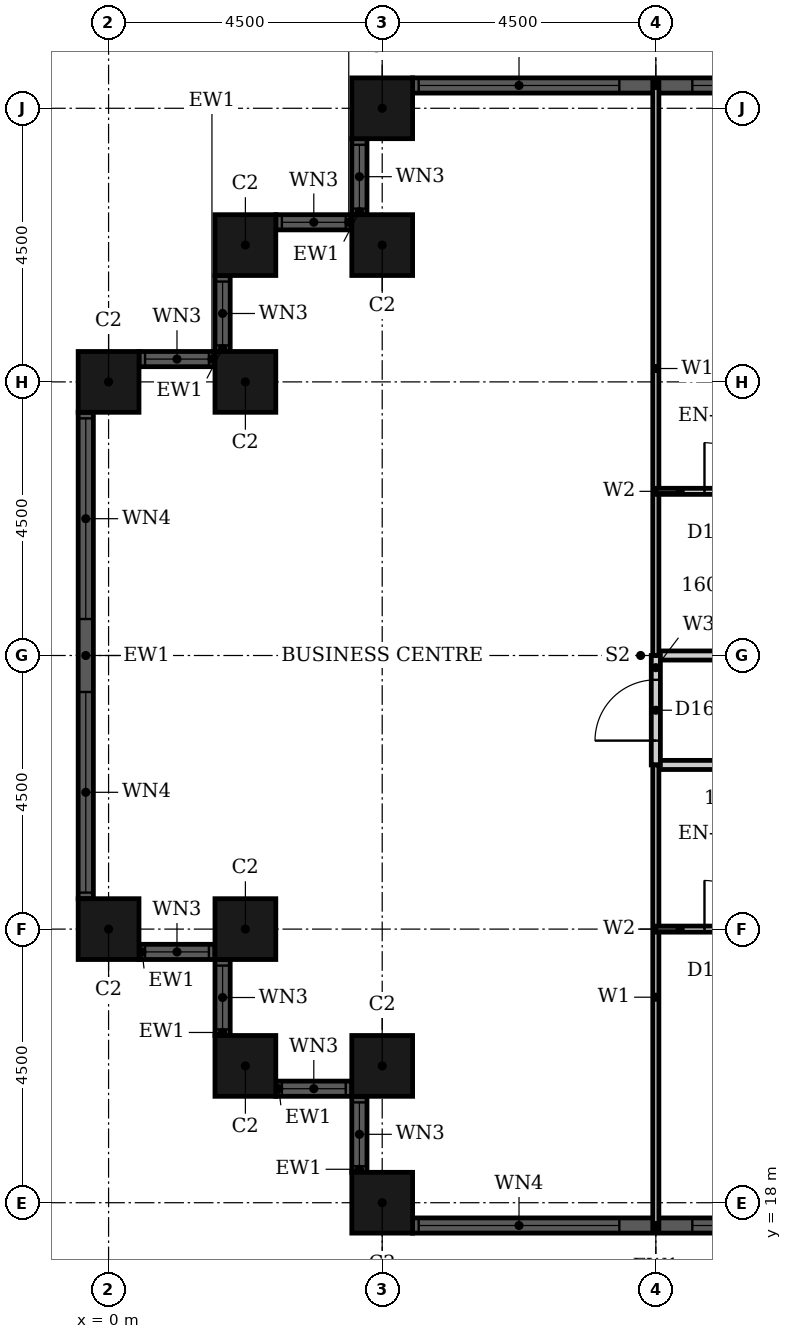
"""IFC4 building model, lengths in metres.
Left out: names, types, materials, properties, quantities, classifications, styles, units other than length and angle.
Written with IfcOpenShell. Run it as: python <this file> out.ifc"""

import sys

from ifc_helpers import new_model, si_unit, direction, frame, frame_2d, origin, origin_2d, place, context, subcontext, project, spatial, rectangle, hollow_rectangle, extrude, element, fill, save


model = new_model("IFC4")
c1 = context("Model", 3, precision=1e-05, world=origin(), true_north=direction((0.0, 1.0)))
c2 = subcontext(c1, "Body", "Model", "MODEL_VIEW")
j1 = project(units=[si_unit("LENGTHUNIT", "METRE"), si_unit("PLANEANGLEUNIT", "RADIAN")], contexts=[c1])
p1 = place(None, origin())
s1 = spatial("IfcSite", under=j1, at=p1, CompositionType="ELEMENT")
p2 = place(p1, origin())
s2 = spatial("IfcBuilding", under=s1, at=p2, CompositionType="ELEMENT")
p3 = place(p2, frame((0.0, 0.0, 70.8)))
s3 = spatial("IfcBuildingStorey", under=s2, at=p3, CompositionType="ELEMENT", Elevation=70.8)
for number, where, z_axis, x_axis in (
    (1, (4.5, 36.0, 0.0), (0.0, 0.0, 1.0), (1.0, 0.0, 0.0)),
    (2, (4.5, 33.75, 0.0), (0.0, 0.0, 1.0), (1.0, 0.0, 0.0)),
    (3, (2.25, 33.75, 0.0), (0.0, 0.0, 1.0), (1.0, 0.0, 0.0)),
    (4, (2.25, 31.5, 0.0), (0.0, 0.0, 1.0), (1.0, 0.0, 0.0)),
    (5, (0.0, 31.5, 0.0), (0.0, 0.0, 1.0), (1.0, 0.0, 0.0)),
    (6, (0.0, 22.5, 0.0), (0.0, 0.0, 1.0), (1.0, 0.0, 0.0)),
    (7, (2.25, 22.5, 0.0), (0.0, 0.0, 1.0), (1.0, 0.0, 0.0)),
    (8, (2.25, 20.25, 0.0), (0.0, 0.0, 1.0), (1.0, 0.0, 0.0)),
    (9, (4.5, 20.25, 0.0), (0.0, 0.0, 1.0), (1.0, 0.0, 0.0)),
    (10, (4.5, 18.0, 0.0), (0.0, 0.0, 1.0), (1.0, 0.0, 0.0)),
):
    element("IfcColumn", number, at=place(p3, frame(where, z_axis=z_axis, x_axis=x_axis)), inside=s3, PredefinedType="COLUMN", context=c2, shape_type="SweptSolid", body=[
        extrude(hollow_rectangle(XDim=1.0, YDim=1.0, WallThickness=0.032, at=origin_2d()), origin(), (0.0, 0.0, 1.0), 3.6),
    ])
p4 = place(p3, frame((13.0, 36.375, 0.0), z_axis=(0.0, 0.0, 1.0), x_axis=(-1.0, 0.0, 0.0)))
e11 = element("IfcWall", 11, at=p4, inside=s3, PredefinedType="SOLIDWALL", context=c2, shape_type="SweptSolid", body=[
    extrude(rectangle(XDim=8.0, YDim=0.25, at=frame_2d((4.0, 0.0))), origin(), (0.0, 0.0, 1.0), 3.6),
])
p5 = place(p4, frame((0.1, 0.0, 0.9)))
e12 = element("IfcOpeningElement", 12, at=p5, cuts=e11, PredefinedType="OPENING", context=c2, shape_type="SweptSolid", body=[
    extrude(rectangle(XDim=3.3, YDim=2.08, at=frame_2d((1.65, 1.04))), frame((0.0, 0.135, 0.0), z_axis=(0.0, -1.0, 0.0), x_axis=(1.0, 0.0, 0.0)), (0.0, 0.0, 1.0), 0.27),
])
p6 = place(p4, frame((4.6, 0.0, 0.9)))
e13 = element("IfcOpeningElement", 13, at=p6, cuts=e11, PredefinedType="OPENING", context=c2, shape_type="SweptSolid", body=[
    extrude(rectangle(XDim=3.3, YDim=2.08, at=frame_2d((1.65, 1.04))), frame((0.0, 0.135, 0.0), z_axis=(0.0, -1.0, 0.0), x_axis=(1.0, 0.0, 0.0)), (0.0, 0.0, 1.0), 0.27),
])
p7 = place(p3, frame((4.125, 35.5, 0.0), z_axis=(0.0, 0.0, 1.0), x_axis=(0.0, -1.0, 0.0)))
e14 = element("IfcWall", 14, at=p7, inside=s3, PredefinedType="SOLIDWALL", context=c2, shape_type="SweptSolid", body=[
    extrude(rectangle(XDim=1.25, YDim=0.25, at=frame_2d((0.625, 0.0))), origin(), (0.0, 0.0, 1.0), 3.6),
])
p8 = place(p7, frame((0.1, 0.0, 0.9)))
e15 = element("IfcOpeningElement", 15, at=p8, cuts=e14, PredefinedType="OPENING", context=c2, shape_type="SweptSolid", body=[
    extrude(rectangle(XDim=1.05, YDim=2.08, at=frame_2d((0.525, 1.04))), frame((0.0, 0.135, 0.0), z_axis=(0.0, -1.0, 0.0), x_axis=(1.0, 0.0, 0.0)), (0.0, 0.0, 1.0), 0.27),
])
p9 = place(p3, frame((4.0, 34.125, 0.0), z_axis=(0.0, 0.0, 1.0), x_axis=(-1.0, 0.0, 0.0)))
e16 = element("IfcWall", 16, at=p9, inside=s3, PredefinedType="SOLIDWALL", context=c2, shape_type="SweptSolid", body=[
    extrude(rectangle(XDim=1.25, YDim=0.25, at=frame_2d((0.625, 0.0))), origin(), (0.0, 0.0, 1.0), 3.6),
])
p10 = place(p9, frame((0.1, 0.0, 0.9)))
e17 = element("IfcOpeningElement", 17, at=p10, cuts=e16, PredefinedType="OPENING", context=c2, shape_type="SweptSolid", body=[
    extrude(rectangle(XDim=1.05, YDim=2.08, at=frame_2d((0.525, 1.04))), frame((0.0, 0.135, 0.0), z_axis=(0.0, -1.0, 0.0), x_axis=(1.0, 0.0, 0.0)), (0.0, 0.0, 1.0), 0.27),
])
p11 = place(p3, frame((1.875, 33.25, 0.0), z_axis=(0.0, 0.0, 1.0), x_axis=(0.0, -1.0, 0.0)))
e18 = element("IfcWall", 18, at=p11, inside=s3, PredefinedType="SOLIDWALL", context=c2, shape_type="SweptSolid", body=[
    extrude(rectangle(XDim=1.25, YDim=0.25, at=frame_2d((0.625, 0.0))), origin(), (0.0, 0.0, 1.0), 3.6),
])
p12 = place(p11, frame((0.1, 0.0, 0.9)))
e19 = element("IfcOpeningElement", 19, at=p12, cuts=e18, PredefinedType="OPENING", context=c2, shape_type="SweptSolid", body=[
    extrude(rectangle(XDim=1.05, YDim=2.08, at=frame_2d((0.525, 1.04))), frame((0.0, 0.135, 0.0), z_axis=(0.0, -1.0, 0.0), x_axis=(1.0, 0.0, 0.0)), (0.0, 0.0, 1.0), 0.27),
])
p13 = place(p3, frame((1.75, 31.875, 0.0), z_axis=(0.0, 0.0, 1.0), x_axis=(-1.0, 0.0, 0.0)))
e20 = element("IfcWall", 20, at=p13, inside=s3, PredefinedType="SOLIDWALL", context=c2, shape_type="SweptSolid", body=[
    extrude(rectangle(XDim=1.25, YDim=0.25, at=frame_2d((0.625, 0.0))), origin(), (0.0, 0.0, 1.0), 3.6),
])
p14 = place(p13, frame((0.1, 0.0, 0.9)))
e21 = element("IfcOpeningElement", 21, at=p14, cuts=e20, PredefinedType="OPENING", context=c2, shape_type="SweptSolid", body=[
    extrude(rectangle(XDim=1.05, YDim=2.08, at=frame_2d((0.525, 1.04))), frame((0.0, 0.135, 0.0), z_axis=(0.0, -1.0, 0.0), x_axis=(1.0, 0.0, 0.0)), (0.0, 0.0, 1.0), 0.27),
])
p15 = place(p3, frame((-0.375, 31.0, 0.0), z_axis=(0.0, 0.0, 1.0), x_axis=(0.0, -1.0, 0.0)))
e22 = element("IfcWall", 22, at=p15, inside=s3, PredefinedType="SOLIDWALL", context=c2, shape_type="SweptSolid", body=[
    extrude(rectangle(XDim=8.0, YDim=0.25, at=frame_2d((4.0, 0.0))), origin(), (0.0, 0.0, 1.0), 3.6),
])
p16 = place(p15, frame((0.1, 0.0, 0.9)))
e23 = element("IfcOpeningElement", 23, at=p16, cuts=e22, PredefinedType="OPENING", context=c2, shape_type="SweptSolid", body=[
    extrude(rectangle(XDim=3.3, YDim=2.08, at=frame_2d((1.65, 1.04))), frame((0.0, 0.135, 0.0), z_axis=(0.0, -1.0, 0.0), x_axis=(1.0, 0.0, 0.0)), (0.0, 0.0, 1.0), 0.27),
])
p17 = place(p15, frame((4.6, 0.0, 0.9)))
e24 = element("IfcOpeningElement", 24, at=p17, cuts=e22, PredefinedType="OPENING", context=c2, shape_type="SweptSolid", body=[
    extrude(rectangle(XDim=3.3, YDim=2.08, at=frame_2d((1.65, 1.04))), frame((0.0, 0.135, 0.0), z_axis=(0.0, -1.0, 0.0), x_axis=(1.0, 0.0, 0.0)), (0.0, 0.0, 1.0), 0.27),
])
p18 = place(p3, frame((0.5, 22.125, 0.0), z_axis=(0.0, 0.0, 1.0), x_axis=(1.0, 0.0, 0.0)))
e25 = element("IfcWall", 25, at=p18, inside=s3, PredefinedType="SOLIDWALL", context=c2, shape_type="SweptSolid", body=[
    extrude(rectangle(XDim=1.25, YDim=0.25, at=frame_2d((0.625, 0.0))), origin(), (0.0, 0.0, 1.0), 3.6),
])
p19 = place(p18, frame((0.1, 0.0, 0.9)))
e26 = element("IfcOpeningElement", 26, at=p19, cuts=e25, PredefinedType="OPENING", context=c2, shape_type="SweptSolid", body=[
    extrude(rectangle(XDim=1.05, YDim=2.08, at=frame_2d((0.525, 1.04))), frame((0.0, 0.135, 0.0), z_axis=(0.0, -1.0, 0.0), x_axis=(1.0, 0.0, 0.0)), (0.0, 0.0, 1.0), 0.27),
])
p20 = place(p3, frame((1.875, 22.0, 0.0), z_axis=(0.0, 0.0, 1.0), x_axis=(0.0, -1.0, 0.0)))
e27 = element("IfcWall", 27, at=p20, inside=s3, PredefinedType="SOLIDWALL", context=c2, shape_type="SweptSolid", body=[
    extrude(rectangle(XDim=1.25, YDim=0.25, at=frame_2d((0.625, 0.0))), origin(), (0.0, 0.0, 1.0), 3.6),
])
p21 = place(p20, frame((0.1, 0.0, 0.9)))
e28 = element("IfcOpeningElement", 28, at=p21, cuts=e27, PredefinedType="OPENING", context=c2, shape_type="SweptSolid", body=[
    extrude(rectangle(XDim=1.05, YDim=2.08, at=frame_2d((0.525, 1.04))), frame((0.0, 0.135, 0.0), z_axis=(0.0, -1.0, 0.0), x_axis=(1.0, 0.0, 0.0)), (0.0, 0.0, 1.0), 0.27),
])
p22 = place(p3, frame((2.75, 19.875, 0.0), z_axis=(0.0, 0.0, 1.0), x_axis=(1.0, 0.0, 0.0)))
e29 = element("IfcWall", 29, at=p22, inside=s3, PredefinedType="SOLIDWALL", context=c2, shape_type="SweptSolid", body=[
    extrude(rectangle(XDim=1.25, YDim=0.25, at=frame_2d((0.625, 0.0))), origin(), (0.0, 0.0, 1.0), 3.6),
])
p23 = place(p22, frame((0.1, 0.0, 0.9)))
e30 = element("IfcOpeningElement", 30, at=p23, cuts=e29, PredefinedType="OPENING", context=c2, shape_type="SweptSolid", body=[
    extrude(rectangle(XDim=1.05, YDim=2.08, at=frame_2d((0.525, 1.04))), frame((0.0, 0.135, 0.0), z_axis=(0.0, -1.0, 0.0), x_axis=(1.0, 0.0, 0.0)), (0.0, 0.0, 1.0), 0.27),
])
p24 = place(p3, frame((4.125, 19.75, 0.0), z_axis=(0.0, 0.0, 1.0), x_axis=(0.0, -1.0, 0.0)))
e31 = element("IfcWall", 31, at=p24, inside=s3, PredefinedType="SOLIDWALL", context=c2, shape_type="SweptSolid", body=[
    extrude(rectangle(XDim=1.25, YDim=0.25, at=frame_2d((0.625, 0.0))), origin(), (0.0, 0.0, 1.0), 3.6),
])
p25 = place(p24, frame((0.1, 0.0, 0.9)))
e32 = element("IfcOpeningElement", 32, at=p25, cuts=e31, PredefinedType="OPENING", context=c2, shape_type="SweptSolid", body=[
    extrude(rectangle(XDim=1.05, YDim=2.08, at=frame_2d((0.525, 1.04))), frame((0.0, 0.135, 0.0), z_axis=(0.0, -1.0, 0.0), x_axis=(1.0, 0.0, 0.0)), (0.0, 0.0, 1.0), 0.27),
])
p26 = place(p3, frame((5.0, 17.625, 0.0), z_axis=(0.0, 0.0, 1.0), x_axis=(1.0, 0.0, 0.0)))
e33 = element("IfcWall", 33, at=p26, inside=s3, PredefinedType="SOLIDWALL", context=c2, shape_type="SweptSolid", body=[
    extrude(rectangle(XDim=8.0, YDim=0.25, at=frame_2d((4.0, 0.0))), origin(), (0.0, 0.0, 1.0), 3.6),
])
p27 = place(p26, frame((0.1, 0.0, 0.9)))
e34 = element("IfcOpeningElement", 34, at=p27, cuts=e33, PredefinedType="OPENING", context=c2, shape_type="SweptSolid", body=[
    extrude(rectangle(XDim=3.3, YDim=2.08, at=frame_2d((1.65, 1.04))), frame((0.0, 0.135, 0.0), z_axis=(0.0, -1.0, 0.0), x_axis=(1.0, 0.0, 0.0)), (0.0, 0.0, 1.0), 0.27),
])
p28 = place(p26, frame((4.6, 0.0, 0.9)))
e35 = element("IfcOpeningElement", 35, at=p28, cuts=e33, PredefinedType="OPENING", context=c2, shape_type="SweptSolid", body=[
    extrude(rectangle(XDim=3.3, YDim=2.08, at=frame_2d((1.65, 1.04))), frame((0.0, 0.135, 0.0), z_axis=(0.0, -1.0, 0.0), x_axis=(1.0, 0.0, 0.0)), (0.0, 0.0, 1.0), 0.27),
])
p29 = place(p3, frame((9.0, 25.2, 0.0), z_axis=(0.0, 0.0, 1.0), x_axis=(1.0, 0.0, 0.0)))
e36 = element("IfcWall", 36, at=p29, inside=s3, PredefinedType="PARTITIONING", context=c2, shape_type="SweptSolid", body=[
    extrude(rectangle(XDim=7.2, YDim=0.15, at=frame_2d((3.6, 0.0))), origin(), (0.0, 0.0, 1.0), 3.3),
])
p30 = place(p29, frame((2.95, 0.0, 0.0)))
e37 = element("IfcOpeningElement", 37, at=p30, cuts=e36, PredefinedType="OPENING", context=c2, shape_type="SweptSolid", body=[
    extrude(rectangle(XDim=1.0, YDim=2.1, at=frame_2d((0.5, 1.05))), frame((0.0, 0.085, 0.0), z_axis=(0.0, -1.0, 0.0), x_axis=(1.0, 0.0, 0.0)), (0.0, 0.0, 1.0), 0.17),
])
p31 = place(p3, frame((9.0, 27.0, 0.0), z_axis=(0.0, 0.0, 1.0), x_axis=(1.0, 0.0, 0.0)))
e38 = element("IfcWall", 38, at=p31, inside=s3, PredefinedType="PARTITIONING", context=c2, shape_type="SweptSolid", body=[
    extrude(rectangle(XDim=7.2, YDim=0.15, at=frame_2d((3.6, 0.0))), origin(), (0.0, 0.0, 1.0), 2.58),
])
p32 = place(p31, frame((2.95, 0.0, 0.0)))
e39 = element("IfcOpeningElement", 39, at=p32, cuts=e38, PredefinedType="OPENING", context=c2, shape_type="SweptSolid", body=[
    extrude(rectangle(XDim=1.0, YDim=2.1, at=frame_2d((0.5, 1.05))), frame((0.0, 0.085, 0.0), z_axis=(0.0, -1.0, 0.0), x_axis=(1.0, 0.0, 0.0)), (0.0, 0.0, 1.0), 0.17),
])
p33 = place(p3, frame((9.0, 25.2, 0.0), z_axis=(0.0, 0.0, 1.0), x_axis=(0.0, 1.0, 0.0)))
e40 = element("IfcWall", 40, at=p33, inside=s3, PredefinedType="PARTITIONING", context=c2, shape_type="SweptSolid", body=[
    extrude(rectangle(XDim=1.8, YDim=0.15, at=frame_2d((0.9, 0.0))), origin(), (0.0, 0.0, 1.0), 3.3),
])
p34 = place(p33, frame((0.4, 0.0, 0.0)))
e41 = element("IfcOpeningElement", 41, at=p34, cuts=e40, PredefinedType="OPENING", context=c2, shape_type="SweptSolid", body=[
    extrude(rectangle(XDim=1.0, YDim=2.1, at=frame_2d((0.5, 1.05))), frame((0.0, 0.085, 0.0), z_axis=(0.0, -1.0, 0.0), x_axis=(1.0, 0.0, 0.0)), (0.0, 0.0, 1.0), 0.17),
])
p35 = place(p3, frame((9.0, 27.0, 0.0), z_axis=(0.0, 0.0, 1.0), x_axis=(0.0, 1.0, 0.0)))
e42 = element("IfcWall", 42, at=p35, inside=s3, PredefinedType="PARTITIONING", context=c2, shape_type="SweptSolid", body=[
    extrude(rectangle(XDim=9.44, YDim=0.1, at=frame_2d((4.72, 0.0))), origin(), (0.0, 0.0, 1.0), 3.3),
])
p36 = place(p3, frame((9.0, 17.56, 0.0), z_axis=(0.0, 0.0, 1.0), x_axis=(0.0, 1.0, 0.0)))
e43 = element("IfcWall", 43, at=p36, inside=s3, PredefinedType="PARTITIONING", context=c2, shape_type="SweptSolid", body=[
    extrude(rectangle(XDim=7.64, YDim=0.1, at=frame_2d((3.82, 0.0))), origin(), (0.0, 0.0, 1.0), 3.3),
])
p37 = place(p3, frame((9.0, 22.5, 0.0), z_axis=(0.0, 0.0, 1.0), x_axis=(1.0, 0.0, 0.0)))
e44 = element("IfcWall", 44, at=p37, inside=s3, PredefinedType="PARTITIONING", context=c2, shape_type="SweptSolid", body=[
    extrude(rectangle(XDim=2.4, YDim=0.1, at=frame_2d((1.2, 0.0))), origin(), (0.0, 0.0, 1.0), 2.58),
])
p38 = place(p37, frame((0.8, 0.0, 0.0)))
e45 = element("IfcOpeningElement", 45, at=p38, cuts=e44, PredefinedType="OPENING", context=c2, shape_type="SweptSolid", body=[
    extrude(rectangle(XDim=0.8, YDim=2.1, at=frame_2d((0.4, 1.05))), frame((0.0, 0.06, 0.0), z_axis=(0.0, -1.0, 0.0), x_axis=(1.0, 0.0, 0.0)), (0.0, 0.0, 1.0), 0.12),
])
p39 = place(p3, frame((9.0, 29.7, 0.0), z_axis=(0.0, 0.0, 1.0), x_axis=(1.0, 0.0, 0.0)))
e46 = element("IfcWall", 46, at=p39, inside=s3, PredefinedType="PARTITIONING", context=c2, shape_type="SweptSolid", body=[
    extrude(rectangle(XDim=2.4, YDim=0.1, at=frame_2d((1.2, 0.0))), origin(), (0.0, 0.0, 1.0), 3.3),
])
p40 = place(p39, frame((0.8, 0.0, 0.0)))
e47 = element("IfcOpeningElement", 47, at=p40, cuts=e46, PredefinedType="OPENING", context=c2, shape_type="SweptSolid", body=[
    extrude(rectangle(XDim=0.8, YDim=2.1, at=frame_2d((0.4, 1.05))), frame((0.0, 0.06, 0.0), z_axis=(0.0, -1.0, 0.0), x_axis=(1.0, 0.0, 0.0)), (0.0, 0.0, 1.0), 0.12),
])
p41 = place(p5, origin())
e48 = element("IfcWindow", 48, at=p41, inside=s3, PartitioningType="SINGLE_PANEL", PredefinedType="WINDOW", context=c2, shape_type="SweptSolid", body=[
    extrude(rectangle(XDim=3.3, YDim=2.08, at=frame_2d((1.65, 1.04))), frame((0.0, 0.03, 0.0), z_axis=(0.0, -1.0, 0.0), x_axis=(1.0, 0.0, 0.0)), (0.0, 0.0, 1.0), 0.06),
])
fill(e12, e48)
p42 = place(p6, origin())
e49 = element("IfcWindow", 49, at=p42, inside=s3, PartitioningType="SINGLE_PANEL", PredefinedType="WINDOW", context=c2, shape_type="SweptSolid", body=[
    extrude(rectangle(XDim=3.3, YDim=2.08, at=frame_2d((1.65, 1.04))), frame((0.0, 0.03, 0.0), z_axis=(0.0, -1.0, 0.0), x_axis=(1.0, 0.0, 0.0)), (0.0, 0.0, 1.0), 0.06),
])
fill(e13, e49)
p43 = place(p8, origin())
e50 = element("IfcWindow", 50, at=p43, inside=s3, PartitioningType="SINGLE_PANEL", PredefinedType="WINDOW", context=c2, shape_type="SweptSolid", body=[
    extrude(rectangle(XDim=1.05, YDim=2.08, at=frame_2d((0.525, 1.04))), frame((0.0, 0.03, 0.0), z_axis=(0.0, -1.0, 0.0), x_axis=(1.0, 0.0, 0.0)), (0.0, 0.0, 1.0), 0.06),
])
fill(e15, e50)
p44 = place(p10, origin())
e51 = element("IfcWindow", 51, at=p44, inside=s3, PartitioningType="SINGLE_PANEL", PredefinedType="WINDOW", context=c2, shape_type="SweptSolid", body=[
    extrude(rectangle(XDim=1.05, YDim=2.08, at=frame_2d((0.525, 1.04))), frame((0.0, 0.03, 0.0), z_axis=(0.0, -1.0, 0.0), x_axis=(1.0, 0.0, 0.0)), (0.0, 0.0, 1.0), 0.06),
])
fill(e17, e51)
p45 = place(p12, origin())
e52 = element("IfcWindow", 52, at=p45, inside=s3, PartitioningType="SINGLE_PANEL", PredefinedType="WINDOW", context=c2, shape_type="SweptSolid", body=[
    extrude(rectangle(XDim=1.05, YDim=2.08, at=frame_2d((0.525, 1.04))), frame((0.0, 0.03, 0.0), z_axis=(0.0, -1.0, 0.0), x_axis=(1.0, 0.0, 0.0)), (0.0, 0.0, 1.0), 0.06),
])
fill(e19, e52)
p46 = place(p14, origin())
e53 = element("IfcWindow", 53, at=p46, inside=s3, PartitioningType="SINGLE_PANEL", PredefinedType="WINDOW", context=c2, shape_type="SweptSolid", body=[
    extrude(rectangle(XDim=1.05, YDim=2.08, at=frame_2d((0.525, 1.04))), frame((0.0, 0.03, 0.0), z_axis=(0.0, -1.0, 0.0), x_axis=(1.0, 0.0, 0.0)), (0.0, 0.0, 1.0), 0.06),
])
fill(e21, e53)
p47 = place(p16, origin())
e54 = element("IfcWindow", 54, at=p47, inside=s3, PartitioningType="SINGLE_PANEL", PredefinedType="WINDOW", context=c2, shape_type="SweptSolid", body=[
    extrude(rectangle(XDim=3.3, YDim=2.08, at=frame_2d((1.65, 1.04))), frame((0.0, 0.03, 0.0), z_axis=(0.0, -1.0, 0.0), x_axis=(1.0, 0.0, 0.0)), (0.0, 0.0, 1.0), 0.06),
])
fill(e23, e54)
p48 = place(p17, origin())
e55 = element("IfcWindow", 55, at=p48, inside=s3, PartitioningType="SINGLE_PANEL", PredefinedType="WINDOW", context=c2, shape_type="SweptSolid", body=[
    extrude(rectangle(XDim=3.3, YDim=2.08, at=frame_2d((1.65, 1.04))), frame((0.0, 0.03, 0.0), z_axis=(0.0, -1.0, 0.0), x_axis=(1.0, 0.0, 0.0)), (0.0, 0.0, 1.0), 0.06),
])
fill(e24, e55)
p49 = place(p19, origin())
e56 = element("IfcWindow", 56, at=p49, inside=s3, PartitioningType="SINGLE_PANEL", PredefinedType="WINDOW", context=c2, shape_type="SweptSolid", body=[
    extrude(rectangle(XDim=1.05, YDim=2.08, at=frame_2d((0.525, 1.04))), frame((0.0, 0.03, 0.0), z_axis=(0.0, -1.0, 0.0), x_axis=(1.0, 0.0, 0.0)), (0.0, 0.0, 1.0), 0.06),
])
fill(e26, e56)
p50 = place(p21, origin())
e57 = element("IfcWindow", 57, at=p50, inside=s3, PartitioningType="SINGLE_PANEL", PredefinedType="WINDOW", context=c2, shape_type="SweptSolid", body=[
    extrude(rectangle(XDim=1.05, YDim=2.08, at=frame_2d((0.525, 1.04))), frame((0.0, 0.03, 0.0), z_axis=(0.0, -1.0, 0.0), x_axis=(1.0, 0.0, 0.0)), (0.0, 0.0, 1.0), 0.06),
])
fill(e28, e57)
p51 = place(p23, origin())
e58 = element("IfcWindow", 58, at=p51, inside=s3, PartitioningType="SINGLE_PANEL", PredefinedType="WINDOW", context=c2, shape_type="SweptSolid", body=[
    extrude(rectangle(XDim=1.05, YDim=2.08, at=frame_2d((0.525, 1.04))), frame((0.0, 0.03, 0.0), z_axis=(0.0, -1.0, 0.0), x_axis=(1.0, 0.0, 0.0)), (0.0, 0.0, 1.0), 0.06),
])
fill(e30, e58)
p52 = place(p25, origin())
e59 = element("IfcWindow", 59, at=p52, inside=s3, PartitioningType="SINGLE_PANEL", PredefinedType="WINDOW", context=c2, shape_type="SweptSolid", body=[
    extrude(rectangle(XDim=1.05, YDim=2.08, at=frame_2d((0.525, 1.04))), frame((0.0, 0.03, 0.0), z_axis=(0.0, -1.0, 0.0), x_axis=(1.0, 0.0, 0.0)), (0.0, 0.0, 1.0), 0.06),
])
fill(e32, e59)
p53 = place(p27, origin())
e60 = element("IfcWindow", 60, at=p53, inside=s3, PartitioningType="SINGLE_PANEL", PredefinedType="WINDOW", context=c2, shape_type="SweptSolid", body=[
    extrude(rectangle(XDim=3.3, YDim=2.08, at=frame_2d((1.65, 1.04))), frame((0.0, 0.03, 0.0), z_axis=(0.0, -1.0, 0.0), x_axis=(1.0, 0.0, 0.0)), (0.0, 0.0, 1.0), 0.06),
])
fill(e34, e60)
p54 = place(p28, origin())
e61 = element("IfcWindow", 61, at=p54, inside=s3, PartitioningType="SINGLE_PANEL", PredefinedType="WINDOW", context=c2, shape_type="SweptSolid", body=[
    extrude(rectangle(XDim=3.3, YDim=2.08, at=frame_2d((1.65, 1.04))), frame((0.0, 0.03, 0.0), z_axis=(0.0, -1.0, 0.0), x_axis=(1.0, 0.0, 0.0)), (0.0, 0.0, 1.0), 0.06),
])
fill(e35, e61)
p55 = place(p38, origin())
e62 = element("IfcDoor", 62, at=p55, inside=s3, OperationType="SINGLE_SWING_RIGHT", PredefinedType="DOOR", context=c2, shape_type="SweptSolid", body=[
    extrude(rectangle(XDim=0.8, YDim=2.1, at=frame_2d((0.4, 1.05))), frame((0.0, 0.025, 0.0), z_axis=(0.0, -1.0, 0.0), x_axis=(1.0, 0.0, 0.0)), (0.0, 0.0, 1.0), 0.05),
])
fill(e45, e62)
p56 = place(p40, origin())
e63 = element("IfcDoor", 63, at=p56, inside=s3, OperationType="SINGLE_SWING_RIGHT", PredefinedType="DOOR", context=c2, shape_type="SweptSolid", body=[
    extrude(rectangle(XDim=0.8, YDim=2.1, at=frame_2d((0.4, 1.05))), frame((0.0, 0.025, 0.0), z_axis=(0.0, -1.0, 0.0), x_axis=(1.0, 0.0, 0.0)), (0.0, 0.0, 1.0), 0.05),
])
fill(e47, e63)
p57 = place(p34, origin())
e64 = element("IfcDoor", 64, at=p57, inside=s3, OperationType="SINGLE_SWING_RIGHT", PredefinedType="DOOR", context=c2, shape_type="SweptSolid", body=[
    extrude(rectangle(XDim=1.0, YDim=2.1, at=frame_2d((0.5, 1.05))), frame((0.0, 0.025, 0.0), z_axis=(0.0, -1.0, 0.0), x_axis=(1.0, 0.0, 0.0)), (0.0, 0.0, 1.0), 0.05),
])
fill(e41, e64)
save(model, sys.argv[1])
